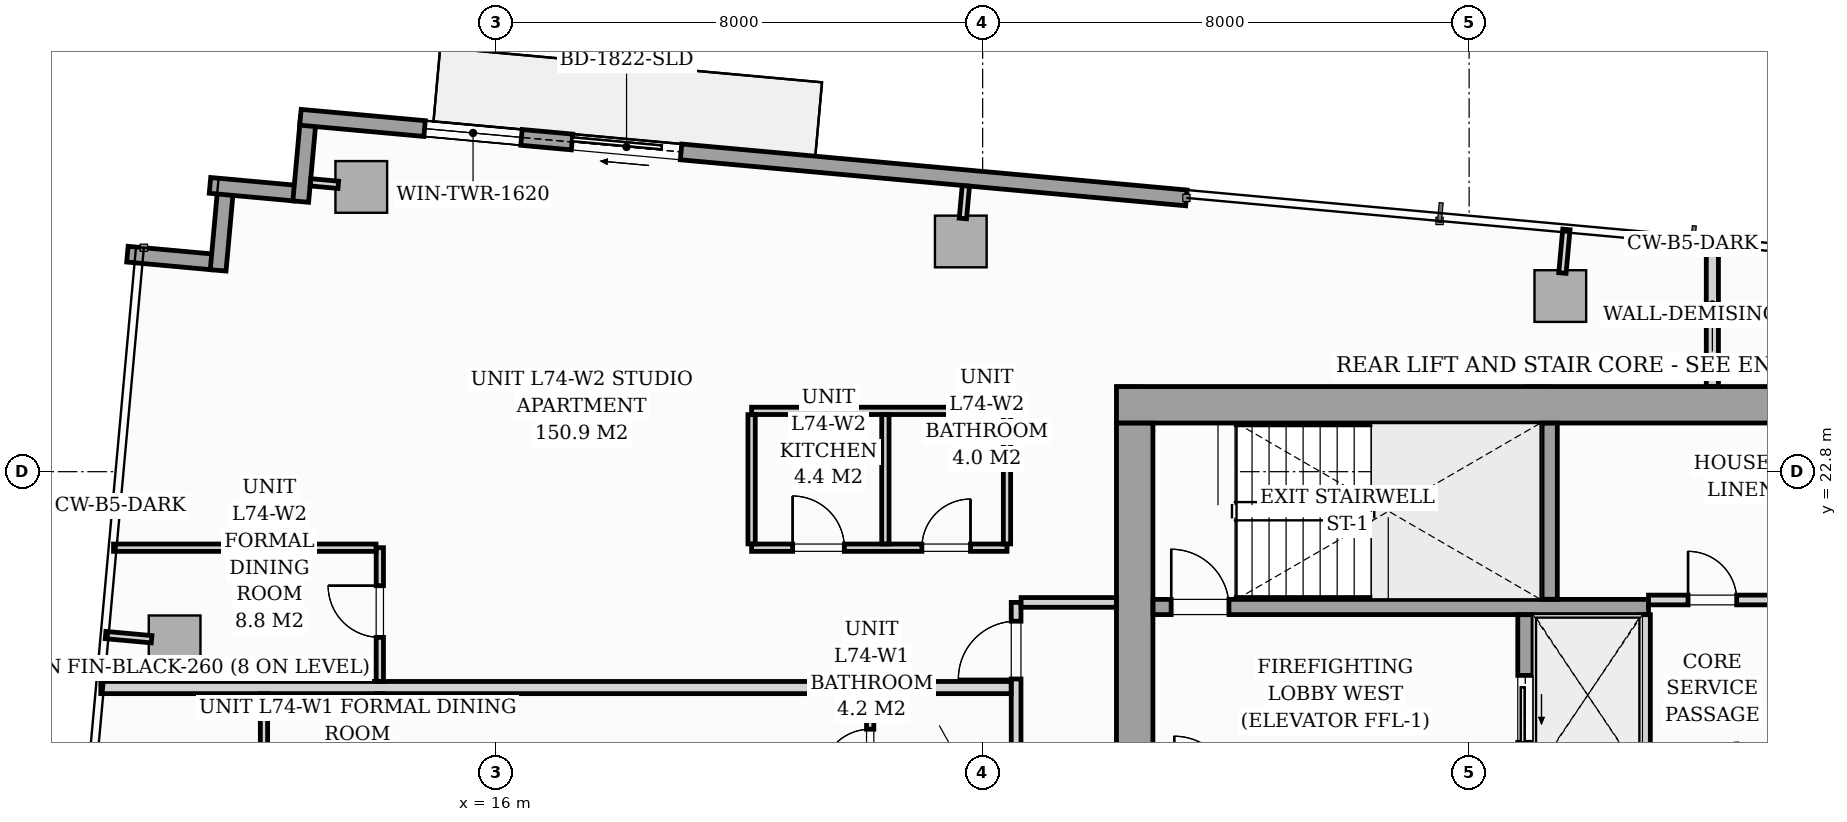
"""IFC4 building model, lengths in metres.
Left out: names, types, materials, properties, quantities, classifications, styles, units other than length and angle.
Written with IfcOpenShell. Run it as: python <this file> out.ifc"""

import sys

from ifc_helpers import new_model, si_unit, direction, frame, frame_2d, origin, origin_2d, place, context, subcontext, project, spatial, rectangle, i_section, extrude, source, transform, mapped, element, fill, save


model = new_model("IFC4")
c1 = context("Model", 3, precision=1e-05, world=origin(), true_north=direction((0.0, 1.0)))
c2 = subcontext(c1, "Body", "Model", "MODEL_VIEW")
j1 = project(units=[si_unit("LENGTHUNIT", "METRE"), si_unit("PLANEANGLEUNIT", "RADIAN")], contexts=[c1])
p1 = place(None, origin())
s1 = spatial("IfcSite", under=j1, at=p1, CompositionType="ELEMENT")
p2 = place(p1, origin())
s2 = spatial("IfcBuilding", under=s1, at=p2, CompositionType="ELEMENT")
p3 = place(p2, frame((0.0, 0.0, 256.2)))
s3 = spatial("IfcBuildingStorey", under=s2, at=p3, CompositionType="ELEMENT", Elevation=256.2)
m1 = source(origin(), c2, "Body", "SweptSolid", [
    extrude(i_section(OverallWidth=0.409, OverallDepth=0.425, WebThickness=0.033, FlangeThickness=0.052, FilletRadius=0.018, at=origin_2d()), origin(), (0.0, 0.0, 1.0), 3.296),
])
for number, where, z_axis, x_axis in (
    (1, (26.4, 24.0, 0.002), (0.0, 0.0, 1.0), (1.0, 0.0, 0.0)),
    (2, (33.12, 24.0, 0.002), (0.0, 0.0, 1.0), (1.0, 0.0, 0.0)),
):
    element("IfcColumn", number, at=place(p3, frame(where, z_axis=z_axis, x_axis=x_axis)), inside=s3, PredefinedType="PILASTER", context=c2, shape_type="MappedRepresentation", body=[
        mapped(m1, transform((0.0, 0.0, 0.0), scale=1.0)),
    ])
m2 = source(origin(), c2, "Body", "SweptSolid", [
    extrude(rectangle(XDim=0.85, YDim=0.85, at=origin_2d()), origin(), (0.0, 0.0, 1.0), 3.294),
])
for number, where, z_axis, x_axis in (
    (3, (13.781, 27.483, 0.002), (0.0, 0.0, 1.0), (0.996, -0.091, 0.0)),
    (4, (23.64, 26.585, 0.002), (0.0, 0.0, 1.0), (0.996, -0.091, 0.0)),
    (5, (33.5, 25.688, 0.002), (0.0, 0.0, 1.0), (0.996, -0.091, 0.0)),
    (6, (10.711, 20.01, 0.002), (0.0, 0.0, 1.0), (0.996, -0.091, 0.0)),
):
    element("IfcColumn", number, at=place(p3, frame(where, z_axis=z_axis, x_axis=x_axis)), inside=s3, PredefinedType="COLUMN", context=c2, shape_type="MappedRepresentation", body=[
        mapped(m2, transform((0.0, 0.0, 0.0), scale=1.0)),
    ])
for number, where, z_axis, x_axis in (
    (7, (9.935, 26.377, 0.0), (0.0, 0.0, 1.0), (0.996, -0.091, 0.0)),
    (8, (11.427, 26.111, 0.0), (0.0, 0.0, 1.0), (0.091, 0.996, 0.0)),
):
    element("IfcWall", number, at=place(p3, frame(where, z_axis=z_axis, x_axis=x_axis)), inside=s3, PredefinedType="STANDARD", context=c2, shape_type="SweptSolid", body=[
        extrude(rectangle(XDim=1.395, YDim=0.26, at=frame_2d((0.698, 0.0))), origin(), (0.0, 0.0, 1.0), 3.0),
    ])
p4 = place(p3, frame((11.293, 27.508, 0.0), z_axis=(0.0, 0.0, 1.0), x_axis=(0.995883159782, -0.090646191665, 0.0)))
e9 = element("IfcWall", 9, at=p4, inside=s3, PredefinedType="STANDARD", context=c2, shape_type="SweptSolid", body=[
    extrude(rectangle(XDim=1.395, YDim=0.26, at=frame_2d((0.698, 0.0))), origin(), (0.0, 0.0, 1.0), 3.0),
])
p5 = place(p3, frame((12.785, 27.242, 0.0), z_axis=(0.0, 0.0, 1.0), x_axis=(0.090472632758, 0.995898942023, 0.0)))
e10 = element("IfcWall", 10, at=p5, inside=s3, PredefinedType="STANDARD", context=c2, shape_type="SweptSolid", body=[
    extrude(rectangle(XDim=1.395, YDim=0.26, at=frame_2d((0.698, 0.0))), origin(), (0.0, 0.0, 1.0), 3.0),
])
p6 = place(p3, frame((12.781, 28.628, 0.0), z_axis=(0.0, 0.0, 1.0), x_axis=(0.995884584572, -0.090630536861, 0.0)))
e11 = element("IfcWall", 11, at=p6, inside=s3, PredefinedType="STANDARD", context=c2, shape_type="SweptSolid", body=[
    extrude(rectangle(XDim=14.63, YDim=0.26, at=frame_2d((7.315, 0.0))), origin(), (0.0, 0.0, 1.0), 3.0),
])
p7 = place(p6, frame((4.485, 0.0, 0.0)))
e12 = element("IfcOpeningElement", 12, at=p7, cuts=e11, PredefinedType="OPENING", context=c2, shape_type="SweptSolid", body=[
    extrude(rectangle(XDim=1.8, YDim=2.06, at=frame_2d((0.9, 1.03))), frame((0.0, 0.14, 0.0), z_axis=(0.0, -1.0, 0.0), x_axis=(1.0, 0.0, 0.0)), (0.0, 0.0, 1.0), 0.28),
])
p8 = place(p6, frame((2.05, 0.0, 0.65)))
e13 = element("IfcOpeningElement", 13, at=p8, cuts=e11, PredefinedType="OPENING", context=c2, shape_type="SweptSolid", body=[
    extrude(rectangle(XDim=1.6, YDim=1.5, at=frame_2d((0.8, 0.75))), frame((0.0, 0.14, 0.0), z_axis=(0.0, -1.0, 0.0), x_axis=(1.0, 0.0, 0.0)), (0.0, 0.0, 1.0), 0.28),
])
p9 = place(p3, frame((26.2, 23.9, 0.0), z_axis=(0.0, 0.0, 1.0), x_axis=(1.0, 0.0, 0.0)))
e14 = element("IfcWall", 14, at=p9, inside=s3, PredefinedType="SHEAR", context=c2, shape_type="SweptSolid", body=[
    extrude(rectangle(XDim=19.6, YDim=0.6, at=frame_2d((9.8, 0.0))), origin(), (0.0, 0.0, 1.0), 3.3),
])
p10 = place(p3, frame((26.5, 17.802, 0.0), z_axis=(0.0, 0.0, 1.0), x_axis=(0.0, 1.0, 0.0)))
e15 = element("IfcWall", 15, at=p10, inside=s3, PredefinedType="SHEAR", context=c2, shape_type="SweptSolid", body=[
    extrude(rectangle(XDim=5.796, YDim=0.6, at=frame_2d((2.898, 0.0))), origin(), (0.0, 0.0, 1.0), 3.3),
])
p11 = place(p3, frame((26.802, 20.575, 0.0), z_axis=(0.0, 0.0, 1.0), x_axis=(1.0, 0.0, 0.0)))
e16 = element("IfcWall", 16, at=p11, inside=s3, PredefinedType="SOLIDWALL", context=c2, shape_type="SweptSolid", body=[
    extrude(rectangle(XDim=8.148, YDim=0.25, at=frame_2d((4.074, 0.0))), origin(), (0.0, 0.0, 1.0), 3.3),
])
p12 = place(p11, frame((0.298, 0.0, 0.0)))
e17 = element("IfcOpeningElement", 17, at=p12, cuts=e16, PredefinedType="OPENING", context=c2, shape_type="SweptSolid", body=[
    extrude(rectangle(XDim=0.95, YDim=2.06, at=frame_2d((0.475, 1.03))), frame((0.0, 0.135, 0.0), z_axis=(0.0, -1.0, 0.0), x_axis=(1.0, 0.0, 0.0)), (0.0, 0.0, 1.0), 0.27),
])
p13 = place(p3, frame((33.325, 20.702, 0.0), z_axis=(0.0, 0.0, 1.0), x_axis=(0.0, 1.0, 0.0)))
e18 = element("IfcWall", 18, at=p13, inside=s3, PredefinedType="SOLIDWALL", context=c2, shape_type="SweptSolid", body=[
    extrude(rectangle(XDim=2.896, YDim=0.25, at=frame_2d((1.448, 0.0))), origin(), (0.0, 0.0, 1.0), 3.3),
])
p14 = place(p3, frame((32.925, 17.802, 0.0), z_axis=(0.0, 0.0, 1.0), x_axis=(0.0, 1.0, 0.0)))
e19 = element("IfcWall", 19, at=p14, inside=s3, PredefinedType="SOLIDWALL", context=c2, shape_type="SweptSolid", body=[
    extrude(rectangle(XDim=2.646, YDim=0.25, at=frame_2d((1.323, 0.0))), origin(), (0.0, 0.0, 1.0), 3.3),
])
p15 = place(p14, frame((0.548, 0.0, 0.0)))
e20 = element("IfcOpeningElement", 20, at=p15, cuts=e19, PredefinedType="OPENING", context=c2, shape_type="SweptSolid", body=[
    extrude(rectangle(XDim=1.1, YDim=2.08, at=frame_2d((0.55, 1.04))), frame((0.0, 0.135, 0.0), z_axis=(0.0, -1.0, 0.0), x_axis=(1.0, 0.0, 0.0)), (0.0, 0.0, 1.0), 0.27),
])
p16 = place(p3, frame((34.9, 17.802, 0.0), z_axis=(0.0, 0.0, 1.0), x_axis=(0.0, 1.0, 0.0)))
e21 = element("IfcWall", 21, at=p16, inside=s3, PredefinedType="PARTITIONING", context=c2, shape_type="SweptSolid", body=[
    extrude(rectangle(XDim=2.646, YDim=0.16, at=frame_2d((1.323, 0.0))), origin(), (0.0, 0.0, 1.0), 3.0),
])
p17 = place(p3, frame((34.95, 20.69, 0.0), z_axis=(0.0, 0.0, 1.0), x_axis=(1.0, 0.0, 0.0)))
e22 = element("IfcWall", 22, at=p17, inside=s3, PredefinedType="PARTITIONING", context=c2, shape_type="SweptSolid", body=[
    extrude(rectangle(XDim=2.1, YDim=0.16, at=frame_2d((1.05, 0.0))), origin(), (0.0, 0.0, 1.0), 3.0),
])
p18 = place(p17, frame((0.65, 0.0, 0.0)))
e23 = element("IfcOpeningElement", 23, at=p18, cuts=e22, PredefinedType="OPENING", context=c2, shape_type="SweptSolid", body=[
    extrude(rectangle(XDim=0.8, YDim=2.05, at=frame_2d((0.4, 1.025))), frame((0.0, 0.09, 0.0), z_axis=(0.0, -1.0, 0.0), x_axis=(1.0, 0.0, 0.0)), (0.0, 0.0, 1.0), 0.18),
])
p19 = place(p3, frame((24.55, 13.442, 0.0), z_axis=(0.0, 0.0, 1.0), x_axis=(0.0, 1.0, 0.0)))
e24 = element("IfcWall", 24, at=p19, inside=s3, PredefinedType="PARTITIONING", context=c2, shape_type="SweptSolid", body=[
    extrude(rectangle(XDim=7.208, YDim=0.16, at=frame_2d((3.604, 0.0))), origin(), (0.0, 0.0, 1.0), 3.0),
])
p20 = place(p19, frame((0.493, 0.0, 0.0)))
e25 = element("IfcOpeningElement", 25, at=p20, cuts=e24, PredefinedType="OPENING", context=c2, shape_type="SweptSolid", body=[
    extrude(rectangle(XDim=0.95, YDim=2.06, at=frame_2d((0.475, 1.03))), frame((0.0, 0.09, 0.0), z_axis=(0.0, -1.0, 0.0), x_axis=(1.0, 0.0, 0.0)), (0.0, 0.0, 1.0), 0.18),
])
p21 = place(p19, frame((5.949, 0.0, 0.0)))
e26 = element("IfcOpeningElement", 26, at=p21, cuts=e24, PredefinedType="OPENING", context=c2, shape_type="SweptSolid", body=[
    extrude(rectangle(XDim=0.95, YDim=2.06, at=frame_2d((0.475, 1.03))), frame((0.0, 0.09, 0.0), z_axis=(0.0, -1.0, 0.0), x_axis=(1.0, 0.0, 0.0)), (0.0, 0.0, 1.0), 0.18),
])
p22 = place(p3, frame((36.0, 24.202, 0.0), z_axis=(0.0, 0.0, 1.0), x_axis=(0.0, 1.0, 0.0)))
e27 = element("IfcWall", 27, at=p22, inside=s3, PredefinedType="PARTITIONING", context=c2, shape_type="SweptSolid", body=[
    extrude(rectangle(XDim=2.363, YDim=0.2, at=frame_2d((1.182, 0.0))), origin(), (0.0, 0.0, 1.0), 3.0),
])
p23 = place(p3, frame((24.632, 20.65, 0.0), z_axis=(0.0, 0.0, 1.0), x_axis=(1.0, 0.0, 0.0)))
e28 = element("IfcWall", 28, at=p23, inside=s3, PredefinedType="PARTITIONING", context=c2, shape_type="SweptSolid", body=[
    extrude(rectangle(XDim=1.566, YDim=0.16, at=frame_2d((0.783, 0.0))), origin(), (0.0, 0.0, 1.0), 3.0),
])
p24 = place(p3, frame((9.497, 19.25, 0.0), z_axis=(0.0, 0.0, 1.0), x_axis=(1.0, 0.0, 0.0)))
e29 = element("IfcWall", 29, at=p24, inside=s3, PredefinedType="PARTITIONING", context=c2, shape_type="SweptSolid", body=[
    extrude(rectangle(XDim=14.971, YDim=0.2, at=frame_2d((7.485, 0.0))), origin(), (0.0, 0.0, 1.0), 2.342),
])
p25 = place(p3, frame((22.15, 15.21, 0.0), z_axis=(0.0, 0.0, 1.0), x_axis=(0.0, 1.0, 0.0)))
e30 = element("IfcWall", 30, at=p25, inside=s3, PredefinedType="PARTITIONING", context=c2, shape_type="SweptSolid", body=[
    extrude(rectangle(XDim=3.938, YDim=0.12, at=frame_2d((1.969, 0.0))), origin(), (0.0, 0.0, 1.0), 3.0),
])
p26 = place(p25, frame((0.56, 0.0, 0.0)))
e31 = element("IfcOpeningElement", 31, at=p26, cuts=e30, PredefinedType="OPENING", context=c2, shape_type="SweptSolid", body=[
    extrude(rectangle(XDim=0.85, YDim=2.05, at=frame_2d((0.425, 1.025))), frame((0.0, 0.07, 0.0), z_axis=(0.0, -1.0, 0.0), x_axis=(1.0, 0.0, 0.0)), (0.0, 0.0, 1.0), 0.14),
])
p27 = place(p25, frame((2.555, 0.0, 0.0)))
e32 = element("IfcOpeningElement", 32, at=p27, cuts=e30, PredefinedType="OPENING", context=c2, shape_type="SweptSolid", body=[
    extrude(rectangle(XDim=0.8, YDim=2.02, at=frame_2d((0.4, 1.01))), frame((0.0, 0.07, 0.0), z_axis=(0.0, -1.0, 0.0), x_axis=(1.0, 0.0, 0.0)), (0.0, 0.0, 1.0), 0.14),
])
p28 = place(p3, frame((12.181, 11.203, 0.0), z_axis=(0.0, 0.0, 1.0), x_axis=(0.0, 1.0, 0.0)))
e33 = element("IfcWall", 33, at=p28, inside=s3, PredefinedType="PARTITIONING", context=c2, shape_type="SweptSolid", body=[
    extrude(rectangle(XDim=7.945, YDim=0.12, at=frame_2d((3.973, 0.0))), origin(), (0.0, 0.0, 1.0), 2.443),
])
p29 = place(p28, frame((4.059, 0.0, 0.0)))
e34 = element("IfcOpeningElement", 34, at=p29, cuts=e33, PredefinedType="OPENING", context=c2, shape_type="SweptSolid", body=[
    extrude(rectangle(XDim=0.85, YDim=2.05, at=frame_2d((0.425, 1.025))), frame((0.0, 0.07, 0.0), z_axis=(0.0, -1.0, 0.0), x_axis=(1.0, 0.0, 0.0)), (0.0, 0.0, 1.0), 0.14),
])
p30 = place(p3, frame((20.2, 21.55, 0.0), z_axis=(0.0, 0.0, 1.0), x_axis=(1.0, 0.0, 0.0)))
e35 = element("IfcWall", 35, at=p30, inside=s3, PredefinedType="PARTITIONING", context=c2, shape_type="SweptSolid", body=[
    extrude(rectangle(XDim=4.2, YDim=0.12, at=frame_2d((2.1, 0.0))), origin(), (0.0, 0.0, 1.0), 3.0),
])
p31 = place(p30, frame((0.675, 0.0, 0.0)))
e36 = element("IfcOpeningElement", 36, at=p31, cuts=e35, PredefinedType="OPENING", context=c2, shape_type="SweptSolid", body=[
    extrude(rectangle(XDim=0.85, YDim=2.05, at=frame_2d((0.425, 1.025))), frame((0.0, 0.07, 0.0), z_axis=(0.0, -1.0, 0.0), x_axis=(1.0, 0.0, 0.0)), (0.0, 0.0, 1.0), 0.14),
])
p32 = place(p30, frame((2.8, 0.0, 0.0)))
e37 = element("IfcOpeningElement", 37, at=p32, cuts=e35, PredefinedType="OPENING", context=c2, shape_type="SweptSolid", body=[
    extrude(rectangle(XDim=0.8, YDim=2.02, at=frame_2d((0.4, 1.01))), frame((0.0, 0.07, 0.0), z_axis=(0.0, -1.0, 0.0), x_axis=(1.0, 0.0, 0.0)), (0.0, 0.0, 1.0), 0.14),
])
p33 = place(p3, frame((20.2, 23.8, 0.0), z_axis=(0.0, 0.0, 1.0), x_axis=(1.0, 0.0, 0.0)))
e38 = element("IfcWall", 38, at=p33, inside=s3, PredefinedType="PARTITIONING", context=c2, shape_type="SweptSolid", body=[
    extrude(rectangle(XDim=4.2, YDim=0.12, at=frame_2d((2.1, 0.0))), origin(), (0.0, 0.0, 1.0), 3.0),
])
for number, where, z_axis, x_axis in (
    (39, (20.2, 21.612, 0.0), (0.0, 0.0, 1.0), (0.0, 1.0, 0.0)),
    (40, (22.4, 21.612, 0.0), (0.0, 0.0, 1.0), (0.0, 1.0, 0.0)),
    (41, (24.4, 21.612, 0.0), (0.0, 0.0, 1.0), (0.0, 1.0, 0.0)),
):
    element("IfcWall", number, at=place(p3, frame(where, z_axis=z_axis, x_axis=x_axis)), inside=s3, PredefinedType="PARTITIONING", context=c2, shape_type="SweptSolid", body=[
        extrude(rectangle(XDim=2.126, YDim=0.12, at=frame_2d((1.063, 0.0))), origin(), (0.0, 0.0, 1.0), 3.0),
    ])
p34 = place(p3, frame((14.086, 18.75, 0.0), z_axis=(0.0, 0.0, 1.0), x_axis=(0.0, 1.0, 0.0)))
e42 = element("IfcWall", 42, at=p34, inside=s3, PredefinedType="PARTITIONING", context=c2, shape_type="SweptSolid", body=[
    extrude(rectangle(XDim=0.398, YDim=0.12, at=frame_2d((0.199, 0.0))), origin(), (0.0, 0.0, 1.0), 3.0),
])
p35 = place(p3, frame((14.086, 19.352, 0.0), z_axis=(0.0, 0.0, 1.0), x_axis=(0.0, 1.0, 0.0)))
e43 = element("IfcWall", 43, at=p35, inside=s3, PredefinedType="PARTITIONING", context=c2, shape_type="SweptSolid", body=[
    extrude(rectangle(XDim=2.198, YDim=0.12, at=frame_2d((1.099, 0.0))), origin(), (0.0, 0.0, 1.0), 3.0),
])
p36 = place(p35, frame((0.723, 0.0, 0.0)))
e44 = element("IfcOpeningElement", 44, at=p36, cuts=e43, PredefinedType="OPENING", context=c2, shape_type="SweptSolid", body=[
    extrude(rectangle(XDim=0.85, YDim=2.05, at=frame_2d((0.425, 1.025))), frame((0.0, 0.07, 0.0), z_axis=(0.0, -1.0, 0.0), x_axis=(1.0, 0.0, 0.0)), (0.0, 0.0, 1.0), 0.14),
])
p37 = place(p3, frame((9.707, 21.55, 0.0), z_axis=(0.0, 0.0, 1.0), x_axis=(1.0, 0.0, 0.0)))
e45 = element("IfcWall", 45, at=p37, inside=s3, PredefinedType="PARTITIONING", context=c2, shape_type="SweptSolid", body=[
    extrude(rectangle(XDim=4.317, YDim=0.12, at=frame_2d((2.159, 0.0))), origin(), (0.0, 0.0, 1.0), 3.0),
])
p38 = place(p3, frame((13.403, 27.517, 0.0), z_axis=(0.0, 0.0, 1.0), x_axis=(-0.995884462012, 0.090631883588, 0.0)))
e46 = element("IfcWall", 46, at=p38, inside=s3, PredefinedType="PARTITIONING", context=c2, shape_type="SweptSolid", body=[
    extrude(rectangle(XDim=0.458, YDim=0.12, at=frame_2d((0.229, 0.0))), origin(), (0.0, 0.0, 1.0), 3.0),
])
p39 = place(p3, frame((23.675, 26.964, 0.0), z_axis=(0.0, 0.0, 1.0), x_axis=(0.090740281653, 0.995874591144, 0.0)))
e47 = element("IfcWall", 47, at=p39, inside=s3, PredefinedType="PARTITIONING", context=c2, shape_type="SweptSolid", body=[
    extrude(rectangle(XDim=0.538, YDim=0.12, at=frame_2d((0.269, 0.0))), origin(), (0.0, 0.0, 1.0), 3.0),
])
p40 = place(p3, frame((33.534, 26.067, 0.0), z_axis=(0.0, 0.0, 1.0), x_axis=(0.090535746043, 0.995893206468, 0.0)))
e48 = element("IfcWall", 48, at=p40, inside=s3, PredefinedType="PARTITIONING", context=c2, shape_type="SweptSolid", body=[
    extrude(rectangle(XDim=0.72, YDim=0.12, at=frame_2d((0.36, 0.0))), origin(), (0.0, 0.0, 1.0), 3.0),
])
p41 = place(p3, frame((10.333, 20.045, 0.0), z_axis=(0.0, 0.0, 1.0), x_axis=(-0.995890573658, 0.09056470228, 0.0)))
e49 = element("IfcWall", 49, at=p41, inside=s3, PredefinedType="PARTITIONING", context=c2, shape_type="SweptSolid", body=[
    extrude(rectangle(XDim=0.76, YDim=0.12, at=frame_2d((0.38, 0.0))), origin(), (0.0, 0.0, 1.0), 3.0),
])
m3 = source(origin(), c2, "Body", "SweptSolid", [
    extrude(rectangle(XDim=1.8, YDim=2.06, at=frame_2d((0.9, 1.03))), frame((0.0, 0.025, 0.0), z_axis=(0.0, -1.0, 0.0), x_axis=(1.0, 0.0, 0.0)), (0.0, 0.0, 1.0), 0.05),
])
p42 = place(p7, origin())
e50 = element("IfcDoor", 50, at=p42, inside=s3, OperationType="SLIDING_TO_LEFT", PredefinedType="DOOR", context=c2, shape_type="MappedRepresentation", body=[
    mapped(m3, transform((0.0, 0.0, 0.0), scale=1.0)),
])
fill(e12, e50)
m4 = source(origin(), c2, "Body", "SweptSolid", [
    extrude(rectangle(XDim=1.6, YDim=1.5, at=frame_2d((0.8, 0.75))), frame((0.0, 0.03, 0.0), z_axis=(0.0, -1.0, 0.0), x_axis=(1.0, 0.0, 0.0)), (0.0, 0.0, 1.0), 0.06),
])
p43 = place(p8, origin())
e51 = element("IfcWindow", 51, at=p43, inside=s3, PartitioningType="SINGLE_PANEL", PredefinedType="WINDOW", context=c2, shape_type="MappedRepresentation", body=[
    mapped(m4, transform((0.0, 0.0, 0.0), scale=1.0)),
])
fill(e13, e51)
m5 = source(origin(), c2, "Body", "SweptSolid", [
    extrude(rectangle(XDim=0.95, YDim=2.06, at=frame_2d((0.475, 1.03))), frame((0.0, 0.025, 0.0), z_axis=(0.0, -1.0, 0.0), x_axis=(1.0, 0.0, 0.0)), (0.0, 0.0, 1.0), 0.05),
])
p44 = place(p12, origin())
e52 = element("IfcDoor", 52, at=p44, inside=s3, OperationType="SINGLE_SWING_LEFT", PredefinedType="DOOR", context=c2, shape_type="MappedRepresentation", body=[
    mapped(m5, transform((0.0, 0.0, 0.0), scale=1.0)),
])
fill(e17, e52)
m6 = source(origin(), c2, "Body", "SweptSolid", [
    extrude(rectangle(XDim=1.1, YDim=2.08, at=frame_2d((0.55, 1.04))), frame((0.0, 0.025, 0.0), z_axis=(0.0, -1.0, 0.0), x_axis=(1.0, 0.0, 0.0)), (0.0, 0.0, 1.0), 0.05),
])
p45 = place(p15, origin())
e53 = element("IfcDoor", 53, at=p45, inside=s3, OperationType="SLIDING_TO_LEFT", PredefinedType="DOOR", context=c2, shape_type="MappedRepresentation", body=[
    mapped(m6, transform((0.0, 0.0, 0.0), scale=1.0)),
])
fill(e20, e53)
m7 = source(origin(), c2, "Body", "SweptSolid", [
    extrude(rectangle(XDim=0.8, YDim=2.05, at=frame_2d((0.4, 1.025))), frame((0.0, 0.025, 0.0), z_axis=(0.0, -1.0, 0.0), x_axis=(1.0, 0.0, 0.0)), (0.0, 0.0, 1.0), 0.05),
])
p46 = place(p18, origin())
e54 = element("IfcDoor", 54, at=p46, inside=s3, OperationType="SINGLE_SWING_LEFT", PredefinedType="DOOR", context=c2, shape_type="MappedRepresentation", body=[
    mapped(m7, transform((0.0, 0.0, 0.0), scale=1.0)),
])
fill(e23, e54)
m8 = source(origin(), c2, "Body", "SweptSolid", [
    extrude(rectangle(XDim=0.8, YDim=2.02, at=frame_2d((0.4, 1.01))), frame((0.0, 0.025, 0.0), z_axis=(0.0, -1.0, 0.0), x_axis=(1.0, 0.0, 0.0)), (0.0, 0.0, 1.0), 0.05),
])
p47 = place(p27, origin())
e55 = element("IfcDoor", 55, at=p47, inside=s3, OperationType="SINGLE_SWING_LEFT", PredefinedType="DOOR", context=c2, shape_type="MappedRepresentation", body=[
    mapped(m8, transform((0.0, 0.0, 0.0), scale=1.0)),
])
fill(e32, e55)
m9 = source(origin(), c2, "Body", "SweptSolid", [
    extrude(rectangle(XDim=0.95, YDim=2.06, at=frame_2d((0.475, 1.03))), frame((0.0, 0.025, 0.0), z_axis=(0.0, -1.0, 0.0), x_axis=(1.0, 0.0, 0.0)), (0.0, 0.0, 1.0), 0.05),
])
p48 = place(p21, origin())
e56 = element("IfcDoor", 56, at=p48, inside=s3, OperationType="SINGLE_SWING_LEFT", PredefinedType="DOOR", context=c2, shape_type="MappedRepresentation", body=[
    mapped(m9, transform((0.0, 0.0, 0.0), scale=1.0)),
])
fill(e26, e56)
m10 = source(origin(), c2, "Body", "SweptSolid", [
    extrude(rectangle(XDim=0.85, YDim=2.05, at=frame_2d((0.425, 1.025))), frame((0.0, 0.025, 0.0), z_axis=(0.0, -1.0, 0.0), x_axis=(1.0, 0.0, 0.0)), (0.0, 0.0, 1.0), 0.05),
])
p49 = place(p36, origin())
e57 = element("IfcDoor", 57, at=p49, inside=s3, OperationType="SINGLE_SWING_RIGHT", PredefinedType="DOOR", context=c2, shape_type="MappedRepresentation", body=[
    mapped(m10, transform((0.0, 0.0, 0.0), scale=1.0)),
])
fill(e44, e57)
p50 = place(p31, origin())
e58 = element("IfcDoor", 58, at=p50, inside=s3, OperationType="SINGLE_SWING_LEFT", PredefinedType="DOOR", context=c2, shape_type="MappedRepresentation", body=[
    mapped(m10, transform((0.0, 0.0, 0.0), scale=1.0)),
])
fill(e36, e58)
p51 = place(p32, origin())
e59 = element("IfcDoor", 59, at=p51, inside=s3, OperationType="SINGLE_SWING_RIGHT", PredefinedType="DOOR", context=c2, shape_type="MappedRepresentation", body=[
    mapped(m8, transform((0.0, 0.0, 0.0), scale=1.0)),
])
fill(e37, e59)
save(model, sys.argv[1])
